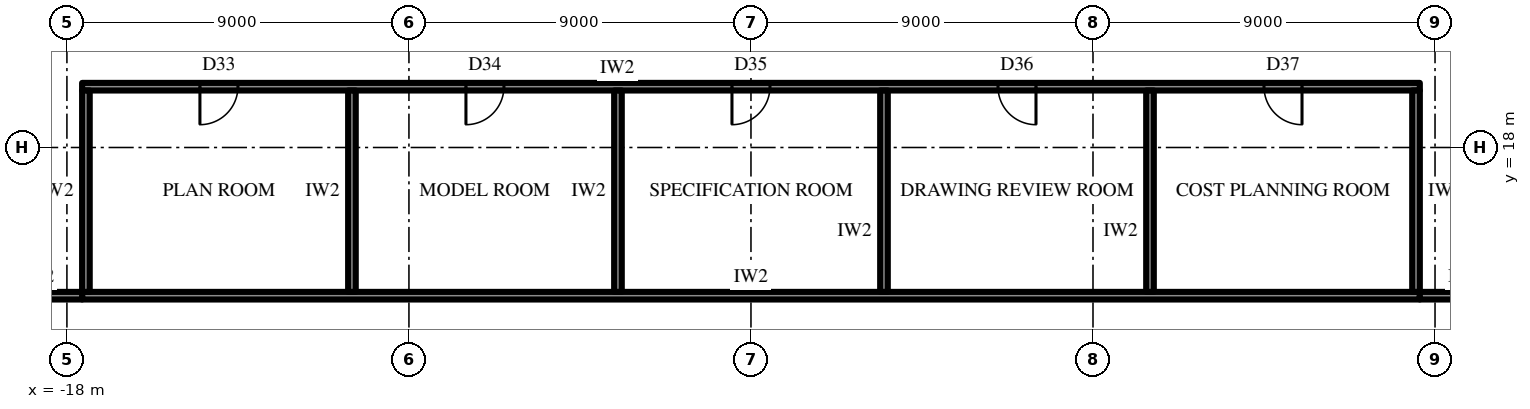
"""IFC4 building model, lengths in metres.
Left out: names, types, materials, properties, quantities, classifications, styles, units other than length and angle.
Written with IfcOpenShell. Run it as: python <this file> out.ifc"""

import sys

from ifc_helpers import new_model, si_unit, direction, frame, frame_2d, origin, place, context, subcontext, project, spatial, rectangle, extrude, element, fill, save


model = new_model("IFC4")
c1 = context("Model", 3, precision=1e-05, world=origin(), true_north=direction((0.0, 1.0)))
c2 = subcontext(c1, "Body", "Model", "MODEL_VIEW")
j1 = project(units=[si_unit("LENGTHUNIT", "METRE"), si_unit("PLANEANGLEUNIT", "RADIAN")], contexts=[c1])
p1 = place(None, origin())
s1 = spatial("IfcSite", under=j1, at=p1, CompositionType="ELEMENT")
p2 = place(p1, origin())
s2 = spatial("IfcBuilding", under=s1, at=p2, CompositionType="ELEMENT")
p3 = place(p2, frame((0.0, 0.0, 61.3)))
s3 = spatial("IfcBuildingStorey", under=s2, at=p3, CompositionType="ELEMENT", Elevation=61.3)
p4 = place(p3, frame((-17.6, 14.1, 0.0), z_axis=(0.0, 0.0, 1.0), x_axis=(1.0, 0.0, 0.0)))
e1 = element("IfcWall", 1, at=p4, inside=s3, PredefinedType="PARTITIONING", context=c2, shape_type="SweptSolid", body=[
    extrude(rectangle(XDim=35.2, YDim=0.2, at=frame_2d((17.6, 0.0))), origin(), (0.0, 0.0, 1.0), 4.0),
])
p5 = place(p3, frame((-17.6, 19.6, 0.0), z_axis=(0.0, 0.0, 1.0), x_axis=(1.0, 0.0, 0.0)))
e2 = element("IfcWall", 2, at=p5, inside=s3, PredefinedType="PARTITIONING", context=c2, shape_type="SweptSolid", body=[
    extrude(rectangle(XDim=35.2, YDim=0.2, at=frame_2d((17.6, 0.0))), origin(), (0.0, 0.0, 1.0), 4.0),
])
p6 = place(p5, frame((3.1, 0.0, 0.0)))
e3 = element("IfcOpeningElement", 3, at=p6, cuts=e2, PredefinedType="OPENING", context=c2, shape_type="SweptSolid", body=[
    extrude(rectangle(XDim=1.0, YDim=2.2, at=frame_2d((0.5, 1.1))), frame((0.0, 0.11, 0.0), z_axis=(0.0, -1.0, 0.0), x_axis=(1.0, 0.0, 0.0)), (0.0, 0.0, 1.0), 0.22),
])
p7 = place(p5, frame((10.1, 0.0, 0.0)))
e4 = element("IfcOpeningElement", 4, at=p7, cuts=e2, PredefinedType="OPENING", context=c2, shape_type="SweptSolid", body=[
    extrude(rectangle(XDim=1.0, YDim=2.2, at=frame_2d((0.5, 1.1))), frame((0.0, 0.11, 0.0), z_axis=(0.0, -1.0, 0.0), x_axis=(1.0, 0.0, 0.0)), (0.0, 0.0, 1.0), 0.22),
])
p8 = place(p5, frame((17.1, 0.0, 0.0)))
e5 = element("IfcOpeningElement", 5, at=p8, cuts=e2, PredefinedType="OPENING", context=c2, shape_type="SweptSolid", body=[
    extrude(rectangle(XDim=1.0, YDim=2.2, at=frame_2d((0.5, 1.1))), frame((0.0, 0.11, 0.0), z_axis=(0.0, -1.0, 0.0), x_axis=(1.0, 0.0, 0.0)), (0.0, 0.0, 1.0), 0.22),
])
p9 = place(p5, frame((24.1, 0.0, 0.0)))
e6 = element("IfcOpeningElement", 6, at=p9, cuts=e2, PredefinedType="OPENING", context=c2, shape_type="SweptSolid", body=[
    extrude(rectangle(XDim=1.0, YDim=2.2, at=frame_2d((0.5, 1.1))), frame((0.0, 0.11, 0.0), z_axis=(0.0, -1.0, 0.0), x_axis=(1.0, 0.0, 0.0)), (0.0, 0.0, 1.0), 0.22),
])
p10 = place(p5, frame((31.1, 0.0, 0.0)))
e7 = element("IfcOpeningElement", 7, at=p10, cuts=e2, PredefinedType="OPENING", context=c2, shape_type="SweptSolid", body=[
    extrude(rectangle(XDim=1.0, YDim=2.2, at=frame_2d((0.5, 1.1))), frame((0.0, 0.11, 0.0), z_axis=(0.0, -1.0, 0.0), x_axis=(1.0, 0.0, 0.0)), (0.0, 0.0, 1.0), 0.22),
])
for number, where, z_axis, x_axis in (
    (8, (-17.5, 14.2, 0.0), (0.0, 0.0, 1.0), (0.0, 1.0, 0.0)),
    (9, (-10.5, 14.2, 0.0), (0.0, 0.0, 1.0), (0.0, 1.0, 0.0)),
    (10, (-3.5, 14.2, 0.0), (0.0, 0.0, 1.0), (0.0, 1.0, 0.0)),
    (11, (3.5, 14.2, 0.0), (0.0, 0.0, 1.0), (0.0, 1.0, 0.0)),
    (12, (10.5, 14.2, 0.0), (0.0, 0.0, 1.0), (0.0, 1.0, 0.0)),
    (13, (17.5, 14.2, 0.0), (0.0, 0.0, 1.0), (0.0, 1.0, 0.0)),
):
    element("IfcWall", number, at=place(p3, frame(where, z_axis=z_axis, x_axis=x_axis)), inside=s3, PredefinedType="PARTITIONING", context=c2, shape_type="SweptSolid", body=[
        extrude(rectangle(XDim=5.3, YDim=0.2, at=frame_2d((2.65, 0.0))), origin(), (0.0, 0.0, 1.0), 4.0),
    ])
for number, where, z_axis, x_axis in (
    (14, (-20.0, 14.1, 0.0), (0.0, 0.0, 1.0), (1.0, 0.0, 0.0)),
    (15, (17.6, 14.1, 0.0), (0.0, 0.0, 1.0), (1.0, 0.0, 0.0)),
):
    element("IfcWall", number, at=place(p3, frame(where, z_axis=z_axis, x_axis=x_axis)), inside=s3, PredefinedType="PARTITIONING", context=c2, shape_type="SweptSolid", body=[
        extrude(rectangle(XDim=2.4, YDim=0.2, at=frame_2d((1.2, 0.0))), origin(), (0.0, 0.0, 1.0), 4.0),
    ])
p11 = place(p6, frame((1.0, 0.0, 0.0), z_axis=(0.0, 0.0, 1.0), x_axis=(-1.0, 0.0, 0.0)))
e16 = element("IfcDoor", 16, at=p11, inside=s3, OperationType="SINGLE_SWING_LEFT", PredefinedType="DOOR", context=c2, shape_type="SweptSolid", body=[
    extrude(rectangle(XDim=1.0, YDim=2.2, at=frame_2d((0.5, 1.1))), frame((0.0, 0.025, 0.0), z_axis=(0.0, -1.0, 0.0), x_axis=(1.0, 0.0, 0.0)), (0.0, 0.0, 1.0), 0.05),
])
fill(e3, e16)
p12 = place(p7, frame((1.0, 0.0, 0.0), z_axis=(0.0, 0.0, 1.0), x_axis=(-1.0, 0.0, 0.0)))
e17 = element("IfcDoor", 17, at=p12, inside=s3, OperationType="SINGLE_SWING_LEFT", PredefinedType="DOOR", context=c2, shape_type="SweptSolid", body=[
    extrude(rectangle(XDim=1.0, YDim=2.2, at=frame_2d((0.5, 1.1))), frame((0.0, 0.025, 0.0), z_axis=(0.0, -1.0, 0.0), x_axis=(1.0, 0.0, 0.0)), (0.0, 0.0, 1.0), 0.05),
])
fill(e4, e17)
p13 = place(p8, frame((1.0, 0.0, 0.0), z_axis=(0.0, 0.0, 1.0), x_axis=(-1.0, 0.0, 0.0)))
e18 = element("IfcDoor", 18, at=p13, inside=s3, OperationType="SINGLE_SWING_LEFT", PredefinedType="DOOR", context=c2, shape_type="SweptSolid", body=[
    extrude(rectangle(XDim=1.0, YDim=2.2, at=frame_2d((0.5, 1.1))), frame((0.0, 0.025, 0.0), z_axis=(0.0, -1.0, 0.0), x_axis=(1.0, 0.0, 0.0)), (0.0, 0.0, 1.0), 0.05),
])
fill(e5, e18)
p14 = place(p9, frame((1.0, 0.0, 0.0), z_axis=(0.0, 0.0, 1.0), x_axis=(-1.0, 0.0, 0.0)))
e19 = element("IfcDoor", 19, at=p14, inside=s3, OperationType="SINGLE_SWING_RIGHT", PredefinedType="DOOR", context=c2, shape_type="SweptSolid", body=[
    extrude(rectangle(XDim=1.0, YDim=2.2, at=frame_2d((0.5, 1.1))), frame((0.0, 0.025, 0.0), z_axis=(0.0, -1.0, 0.0), x_axis=(1.0, 0.0, 0.0)), (0.0, 0.0, 1.0), 0.05),
])
fill(e6, e19)
p15 = place(p10, frame((1.0, 0.0, 0.0), z_axis=(0.0, 0.0, 1.0), x_axis=(-1.0, 0.0, 0.0)))
e20 = element("IfcDoor", 20, at=p15, inside=s3, OperationType="SINGLE_SWING_RIGHT", PredefinedType="DOOR", context=c2, shape_type="SweptSolid", body=[
    extrude(rectangle(XDim=1.0, YDim=2.2, at=frame_2d((0.5, 1.1))), frame((0.0, 0.025, 0.0), z_axis=(0.0, -1.0, 0.0), x_axis=(1.0, 0.0, 0.0)), (0.0, 0.0, 1.0), 0.05),
])
fill(e7, e20)
save(model, sys.argv[1])
